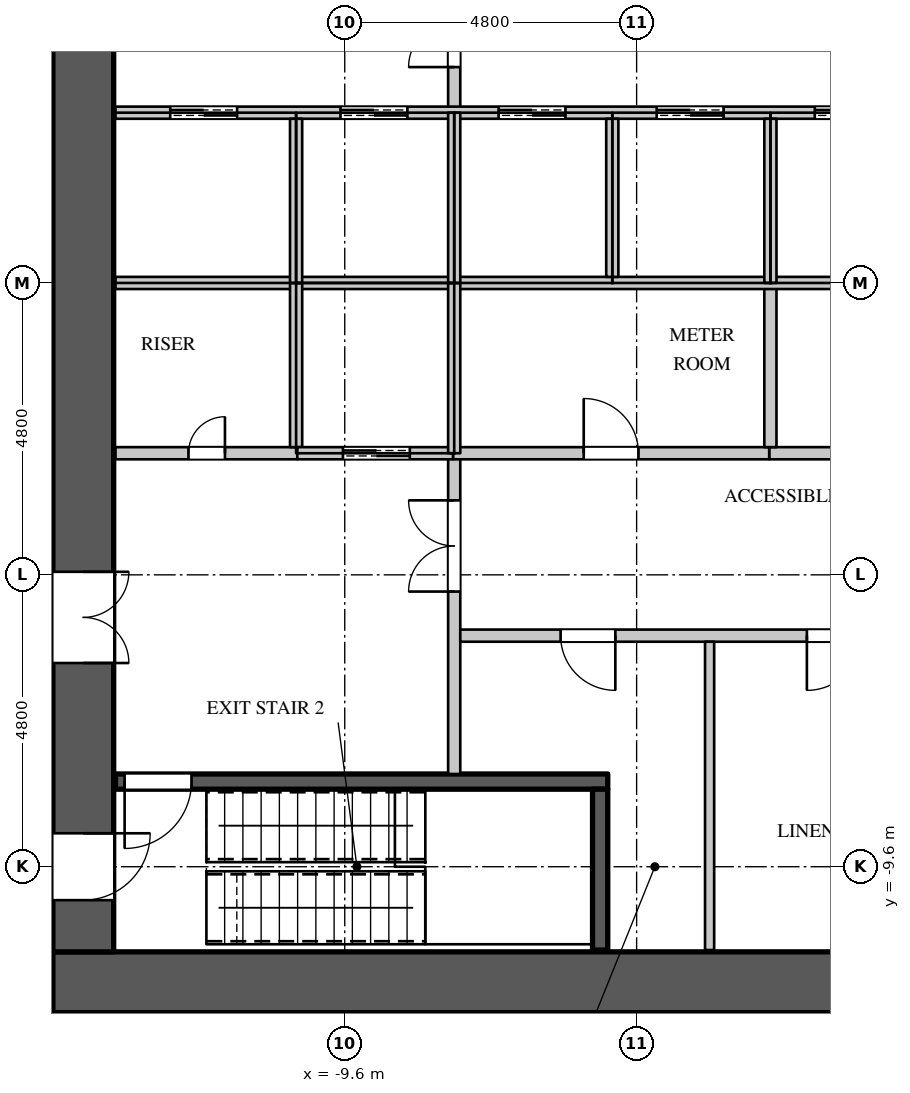
"""IFC4 building model, lengths in metres.
Left out: names, types, materials, properties, quantities, classifications, styles, units other than length and angle.
Written with IfcOpenShell. Run it as: python <this file> out.ifc"""

import sys

from ifc_helpers import new_model, si_unit, direction, frame, frame_2d, origin, place, context, subcontext, project, spatial, rectangle, extrude, element, fill, save


model = new_model("IFC4")
c1 = context("Model", 3, precision=1e-05, world=origin(), true_north=direction((0.0, 1.0)))
c2 = subcontext(c1, "Body", "Model", "MODEL_VIEW")
j1 = project(units=[si_unit("LENGTHUNIT", "METRE"), si_unit("PLANEANGLEUNIT", "RADIAN")], contexts=[c1])
p1 = place(None, origin())
s1 = spatial("IfcSite", under=j1, at=p1, CompositionType="ELEMENT")
p2 = place(p1, origin())
s2 = spatial("IfcBuilding", under=s1, at=p2, CompositionType="ELEMENT")
p3 = place(p2, frame((0.0, 0.0, 92.7)))
s3 = spatial("IfcBuildingStorey", under=s2, at=p3, CompositionType="ELEMENT", Elevation=92.7)
p4 = place(p3, frame((-14.4, -11.5, 0.0), z_axis=(0.0, 0.0, 1.0), x_axis=(1.0, 0.0, 0.0)))
e1 = element("IfcWall", 1, at=p4, inside=s3, PredefinedType="SHEAR", context=c2, shape_type="SweptSolid", body=[
    extrude(rectangle(XDim=28.8, YDim=1.0, at=frame_2d((14.4, 0.0))), origin(), (0.0, 0.0, 1.0), 4.2),
])
p5 = place(p3, frame((-13.9, -11.0, 0.0), z_axis=(0.0, 0.0, 1.0), x_axis=(0.0, 1.0, 0.0)))
e2 = element("IfcWall", 2, at=p5, inside=s3, PredefinedType="SHEAR", context=c2, shape_type="SweptSolid", body=[
    extrude(rectangle(XDim=22.0, YDim=1.0, at=frame_2d((11.0, 0.0))), origin(), (0.0, 0.0, 1.0), 4.2),
])
p6 = place(p5, frame((20.05, 0.0, 0.0)))
e3 = element("IfcOpeningElement", 3, at=p6, cuts=e2, PredefinedType="OPENING", context=c2, shape_type="SweptSolid", body=[
    extrude(rectangle(XDim=1.1, YDim=2.2, at=frame_2d((0.55, 1.1))), frame((0.0, 0.51, 0.0), z_axis=(0.0, -1.0, 0.0), x_axis=(1.0, 0.0, 0.0)), (0.0, 0.0, 1.0), 1.02),
])
p7 = place(p5, frame((0.85, 0.0, 0.0)))
e4 = element("IfcOpeningElement", 4, at=p7, cuts=e2, PredefinedType="OPENING", context=c2, shape_type="SweptSolid", body=[
    extrude(rectangle(XDim=1.1, YDim=2.2, at=frame_2d((0.55, 1.1))), frame((0.0, 0.51, 0.0), z_axis=(0.0, -1.0, 0.0), x_axis=(1.0, 0.0, 0.0)), (0.0, 0.0, 1.0), 1.02),
])
p8 = place(p5, frame((15.75, 0.0, 0.0)))
e5 = element("IfcOpeningElement", 5, at=p8, cuts=e2, PredefinedType="OPENING", context=c2, shape_type="SweptSolid", body=[
    extrude(rectangle(XDim=1.5, YDim=2.4, at=frame_2d((0.75, 1.2))), frame((0.0, 0.51, 0.0), z_axis=(0.0, -1.0, 0.0), x_axis=(1.0, 0.0, 0.0)), (0.0, 0.0, 1.0), 1.02),
])
p9 = place(p5, frame((4.75, 0.0, 0.0)))
e6 = element("IfcOpeningElement", 6, at=p9, cuts=e2, PredefinedType="OPENING", context=c2, shape_type="SweptSolid", body=[
    extrude(rectangle(XDim=1.5, YDim=2.4, at=frame_2d((0.75, 1.2))), frame((0.0, 0.51, 0.0), z_axis=(0.0, -1.0, 0.0), x_axis=(1.0, 0.0, 0.0)), (0.0, 0.0, 1.0), 1.02),
])
p10 = place(p3, frame((-7.8, -8.075, 0.0), z_axis=(0.0, 0.0, 1.0), x_axis=(0.0, 1.0, 0.0)))
e7 = element("IfcWall", 7, at=p10, inside=s3, PredefinedType="PARTITIONING", context=c2, shape_type="SweptSolid", body=[
    extrude(rectangle(XDim=5.275, YDim=0.2, at=frame_2d((2.637, 0.0))), origin(), (0.0, 0.0, 1.0), 3.798),
])
p11 = place(p10, frame((3.0, 0.0, 0.0)))
e8 = element("IfcOpeningElement", 8, at=p11, cuts=e7, PredefinedType="OPENING", context=c2, shape_type="SweptSolid", body=[
    extrude(rectangle(XDim=1.5, YDim=2.4, at=frame_2d((0.75, 1.2))), frame((0.0, 0.11, 0.0), z_axis=(0.0, -1.0, 0.0), x_axis=(1.0, 0.0, 0.0)), (0.0, 0.0, 1.0), 0.22),
])
p12 = place(p3, frame((-7.7, -5.8, 0.0), z_axis=(0.0, 0.0, 1.0), x_axis=(1.0, 0.0, 0.0)))
e9 = element("IfcWall", 9, at=p12, inside=s3, PredefinedType="PARTITIONING", context=c2, shape_type="SweptSolid", body=[
    extrude(rectangle(XDim=21.07, YDim=0.2, at=frame_2d((10.535, 0.0))), origin(), (0.0, 0.0, 1.0), 3.798),
])
p13 = place(p12, frame((1.65, 0.0, 0.0)))
e10 = element("IfcOpeningElement", 10, at=p13, cuts=e9, PredefinedType="OPENING", context=c2, shape_type="SweptSolid", body=[
    extrude(rectangle(XDim=0.9, YDim=2.2, at=frame_2d((0.45, 1.1))), frame((0.0, 0.11, 0.0), z_axis=(0.0, -1.0, 0.0), x_axis=(1.0, 0.0, 0.0)), (0.0, 0.0, 1.0), 0.22),
])
p14 = place(p12, frame((5.7, 0.0, 0.0)))
e11 = element("IfcOpeningElement", 11, at=p14, cuts=e9, PredefinedType="OPENING", context=c2, shape_type="SweptSolid", body=[
    extrude(rectangle(XDim=0.9, YDim=2.2, at=frame_2d((0.45, 1.1))), frame((0.0, 0.11, 0.0), z_axis=(0.0, -1.0, 0.0), x_axis=(1.0, 0.0, 0.0)), (0.0, 0.0, 1.0), 0.22),
])
p15 = place(p12, frame((10.2, 0.0, 0.0)))
e12 = element("IfcOpeningElement", 12, at=p15, cuts=e9, PredefinedType="OPENING", context=c2, shape_type="SweptSolid", body=[
    extrude(rectangle(XDim=0.9, YDim=2.2, at=frame_2d((0.45, 1.1))), frame((0.0, 0.11, 0.0), z_axis=(0.0, -1.0, 0.0), x_axis=(1.0, 0.0, 0.0)), (0.0, 0.0, 1.0), 0.22),
])
p16 = place(p12, frame((14.55, 0.0, 0.0)))
e13 = element("IfcOpeningElement", 13, at=p16, cuts=e9, PredefinedType="OPENING", context=c2, shape_type="SweptSolid", body=[
    extrude(rectangle(XDim=0.9, YDim=2.2, at=frame_2d((0.45, 1.1))), frame((0.0, 0.11, 0.0), z_axis=(0.0, -1.0, 0.0), x_axis=(1.0, 0.0, 0.0)), (0.0, 0.0, 1.0), 0.22),
])
p17 = place(p12, frame((18.5, 0.0, 0.0)))
e14 = element("IfcOpeningElement", 14, at=p17, cuts=e9, PredefinedType="OPENING", context=c2, shape_type="SweptSolid", body=[
    extrude(rectangle(XDim=0.9, YDim=2.2, at=frame_2d((0.45, 1.1))), frame((0.0, 0.11, 0.0), z_axis=(0.0, -1.0, 0.0), x_axis=(1.0, 0.0, 0.0)), (0.0, 0.0, 1.0), 0.22),
])
p18 = place(p3, frame((-7.8, 2.8, 0.0), z_axis=(0.0, 0.0, 1.0), x_axis=(0.0, 1.0, 0.0)))
e15 = element("IfcWall", 15, at=p18, inside=s3, PredefinedType="PARTITIONING", context=c2, shape_type="SweptSolid", body=[
    extrude(rectangle(XDim=5.275, YDim=0.2, at=frame_2d((2.637, 0.0))), origin(), (0.0, 0.0, 1.0), 3.798),
])
p19 = place(p18, frame((0.75, 0.0, 0.0)))
e16 = element("IfcOpeningElement", 16, at=p19, cuts=e15, PredefinedType="OPENING", context=c2, shape_type="SweptSolid", body=[
    extrude(rectangle(XDim=1.5, YDim=2.4, at=frame_2d((0.75, 1.2))), frame((0.0, 0.11, 0.0), z_axis=(0.0, -1.0, 0.0), x_axis=(1.0, 0.0, 0.0)), (0.0, 0.0, 1.0), 0.22),
])
p20 = place(p3, frame((-2.62, -2.8, 0.0), z_axis=(0.0, 0.0, 1.0), x_axis=(1.0, 0.0, 0.0)))
e17 = element("IfcWall", 17, at=p20, inside=s3, PredefinedType="PARTITIONING", context=c2, shape_type="SweptSolid", body=[
    extrude(rectangle(XDim=10.44, YDim=0.2, at=frame_2d((5.22, 0.0))), origin(), (0.0, 0.0, 1.0), 3.798),
])
p21 = place(p20, frame((2.25, 0.0, 0.0)))
e18 = element("IfcOpeningElement", 18, at=p21, cuts=e17, PredefinedType="OPENING", context=c2, shape_type="SweptSolid", body=[
    extrude(rectangle(XDim=0.9, YDim=2.2, at=frame_2d((0.45, 1.1))), frame((0.0, 0.11, 0.0), z_axis=(0.0, -1.0, 0.0), x_axis=(1.0, 0.0, 0.0)), (0.0, 0.0, 1.0), 0.22),
])
p22 = place(p20, frame((7.3, 0.0, 0.0)))
e19 = element("IfcOpeningElement", 19, at=p22, cuts=e17, PredefinedType="OPENING", context=c2, shape_type="SweptSolid", body=[
    extrude(rectangle(XDim=0.9, YDim=2.2, at=frame_2d((0.45, 1.1))), frame((0.0, 0.11, 0.0), z_axis=(0.0, -1.0, 0.0), x_axis=(1.0, 0.0, 0.0)), (0.0, 0.0, 1.0), 0.22),
])
p23 = place(p3, frame((-3.6, -10.97, 0.0), z_axis=(0.0, 0.0, 1.0), x_axis=(0.0, 1.0, 0.0)))
e20 = element("IfcWall", 20, at=p23, inside=s3, PredefinedType="PARTITIONING", context=c2, shape_type="SweptSolid", body=[
    extrude(rectangle(XDim=5.07, YDim=0.15, at=frame_2d((2.535, 0.0))), origin(), (0.0, 0.0, 1.0), 3.798),
])
p24 = place(p3, frame((-13.37, -2.8, 0.0), z_axis=(0.0, 0.0, 1.0), x_axis=(1.0, 0.0, 0.0)))
e21 = element("IfcWall", 21, at=p24, inside=s3, PredefinedType="PARTITIONING", context=c2, shape_type="SweptSolid", body=[
    extrude(rectangle(XDim=2.99, YDim=0.2, at=frame_2d((1.495, 0.0))), origin(), (0.0, 0.0, 1.0), 3.798),
])
p25 = place(p24, frame((1.2, 0.0, 0.0)))
e22 = element("IfcOpeningElement", 22, at=p25, cuts=e21, PredefinedType="OPENING", context=c2, shape_type="SweptSolid", body=[
    extrude(rectangle(XDim=0.6, YDim=2.0, at=frame_2d((0.3, 1.0))), frame((0.0, 0.11, 0.0), z_axis=(0.0, -1.0, 0.0), x_axis=(1.0, 0.0, 0.0)), (0.0, 0.0, 1.0), 0.22),
])
p26 = place(p3, frame((-7.82, -2.8, 0.0), z_axis=(0.0, 0.0, 1.0), x_axis=(1.0, 0.0, 0.0)))
e23 = element("IfcWall", 23, at=p26, inside=s3, PredefinedType="PARTITIONING", context=c2, shape_type="SweptSolid", body=[
    extrude(rectangle(XDim=5.2, YDim=0.2, at=frame_2d((2.6, 0.0))), origin(), (0.0, 0.0, 1.0), 3.798),
])
p27 = place(p26, frame((2.15, 0.0, 0.0)))
e24 = element("IfcOpeningElement", 24, at=p27, cuts=e23, PredefinedType="OPENING", context=c2, shape_type="SweptSolid", body=[
    extrude(rectangle(XDim=0.9, YDim=2.2, at=frame_2d((0.45, 1.1))), frame((0.0, 0.11, 0.0), z_axis=(0.0, -1.0, 0.0), x_axis=(1.0, 0.0, 0.0)), (0.0, 0.0, 1.0), 0.22),
])
p28 = place(p3, frame((-2.6, -2.7, 0.0), z_axis=(0.0, 0.0, 1.0), x_axis=(0.0, 1.0, 0.0)))
e25 = element("IfcWall", 25, at=p28, inside=s3, PredefinedType="PARTITIONING", context=c2, shape_type="SweptSolid", body=[
    extrude(rectangle(XDim=2.7, YDim=0.2, at=frame_2d((1.35, 0.0))), origin(), (0.0, 0.0, 1.0), 3.798),
])
p29 = place(p3, frame((-13.37, 0.0, 0.0), z_axis=(0.0, 0.0, 1.0), x_axis=(1.0, 0.0, 0.0)))
e26 = element("IfcWall", 26, at=p29, inside=s3, PredefinedType="PARTITIONING", context=c2, shape_type="SweptSolid", body=[
    extrude(rectangle(XDim=23.77, YDim=0.2, at=frame_2d((11.885, 0.0))), origin(), (0.0, 0.0, 1.0), 3.798),
])
p30 = place(p3, frame((-13.37, 2.8, 0.0), z_axis=(0.0, 0.0, 1.0), x_axis=(1.0, 0.0, 0.0)))
e27 = element("IfcWall", 27, at=p30, inside=s3, PredefinedType="PARTITIONING", context=c2, shape_type="SweptSolid", body=[
    extrude(rectangle(XDim=23.77, YDim=0.2, at=frame_2d((11.885, 0.0))), origin(), (0.0, 0.0, 1.0), 3.798),
])
p31 = place(p30, frame((0.9, 0.0, 0.0)))
e28 = element("IfcOpeningElement", 28, at=p31, cuts=e27, PredefinedType="OPENING", context=c2, shape_type="SweptSolid", body=[
    extrude(rectangle(XDim=1.1, YDim=2.2, at=frame_2d((0.55, 1.1))), frame((0.0, 0.11, 0.0), z_axis=(0.0, -1.0, 0.0), x_axis=(1.0, 0.0, 0.0)), (0.0, 0.0, 1.0), 0.22),
])
p32 = place(p30, frame((3.7, 0.0, 0.0)))
e29 = element("IfcOpeningElement", 29, at=p32, cuts=e27, PredefinedType="OPENING", context=c2, shape_type="SweptSolid", body=[
    extrude(rectangle(XDim=1.1, YDim=2.2, at=frame_2d((0.55, 1.1))), frame((0.0, 0.11, 0.0), z_axis=(0.0, -1.0, 0.0), x_axis=(1.0, 0.0, 0.0)), (0.0, 0.0, 1.0), 0.22),
])
p33 = place(p30, frame((6.3, 0.0, 0.0)))
e30 = element("IfcOpeningElement", 30, at=p33, cuts=e27, PredefinedType="OPENING", context=c2, shape_type="SweptSolid", body=[
    extrude(rectangle(XDim=1.1, YDim=2.2, at=frame_2d((0.55, 1.1))), frame((0.0, 0.11, 0.0), z_axis=(0.0, -1.0, 0.0), x_axis=(1.0, 0.0, 0.0)), (0.0, 0.0, 1.0), 0.22),
])
p34 = place(p30, frame((8.9, 0.0, 0.0)))
e31 = element("IfcOpeningElement", 31, at=p34, cuts=e27, PredefinedType="OPENING", context=c2, shape_type="SweptSolid", body=[
    extrude(rectangle(XDim=1.1, YDim=2.2, at=frame_2d((0.55, 1.1))), frame((0.0, 0.11, 0.0), z_axis=(0.0, -1.0, 0.0), x_axis=(1.0, 0.0, 0.0)), (0.0, 0.0, 1.0), 0.22),
])
p35 = place(p30, frame((11.5, 0.0, 0.0)))
e32 = element("IfcOpeningElement", 32, at=p35, cuts=e27, PredefinedType="OPENING", context=c2, shape_type="SweptSolid", body=[
    extrude(rectangle(XDim=1.1, YDim=2.2, at=frame_2d((0.55, 1.1))), frame((0.0, 0.11, 0.0), z_axis=(0.0, -1.0, 0.0), x_axis=(1.0, 0.0, 0.0)), (0.0, 0.0, 1.0), 0.22),
])
p36 = place(p30, frame((14.1, 0.0, 0.0)))
e33 = element("IfcOpeningElement", 33, at=p36, cuts=e27, PredefinedType="OPENING", context=c2, shape_type="SweptSolid", body=[
    extrude(rectangle(XDim=1.1, YDim=2.2, at=frame_2d((0.55, 1.1))), frame((0.0, 0.11, 0.0), z_axis=(0.0, -1.0, 0.0), x_axis=(1.0, 0.0, 0.0)), (0.0, 0.0, 1.0), 0.22),
])
p37 = place(p30, frame((16.7, 0.0, 0.0)))
e34 = element("IfcOpeningElement", 34, at=p37, cuts=e27, PredefinedType="OPENING", context=c2, shape_type="SweptSolid", body=[
    extrude(rectangle(XDim=1.1, YDim=2.2, at=frame_2d((0.55, 1.1))), frame((0.0, 0.11, 0.0), z_axis=(0.0, -1.0, 0.0), x_axis=(1.0, 0.0, 0.0)), (0.0, 0.0, 1.0), 0.22),
])
p38 = place(p30, frame((19.3, 0.0, 0.0)))
e35 = element("IfcOpeningElement", 35, at=p38, cuts=e27, PredefinedType="OPENING", context=c2, shape_type="SweptSolid", body=[
    extrude(rectangle(XDim=1.1, YDim=2.2, at=frame_2d((0.55, 1.1))), frame((0.0, 0.11, 0.0), z_axis=(0.0, -1.0, 0.0), x_axis=(1.0, 0.0, 0.0)), (0.0, 0.0, 1.0), 0.22),
])
p39 = place(p3, frame((-10.4, -2.7, 0.0), z_axis=(0.0, 0.0, 1.0), x_axis=(0.0, 1.0, 0.0)))
e36 = element("IfcWall", 36, at=p39, inside=s3, PredefinedType="PARTITIONING", context=c2, shape_type="SweptSolid", body=[
    extrude(rectangle(XDim=2.7, YDim=0.2, at=frame_2d((1.35, 0.0))), origin(), (0.0, 0.0, 1.0), 3.798),
])
p40 = place(p3, frame((-10.38, -2.8, 0.0), z_axis=(0.0, 0.0, 1.0), x_axis=(1.0, 0.0, 0.0)))
e37 = element("IfcWall", 37, at=p40, inside=s3, PredefinedType="PARTITIONING", context=c2, shape_type="SweptSolid", body=[
    extrude(rectangle(XDim=2.56, YDim=0.2, at=frame_2d((1.28, 0.0))), origin(), (0.0, 0.0, 1.0), 3.798),
])
p41 = place(p40, frame((0.75, 0.0, 0.0)))
e38 = element("IfcOpeningElement", 38, at=p41, cuts=e37, PredefinedType="OPENING", context=c2, shape_type="SweptSolid", body=[
    extrude(rectangle(XDim=1.1, YDim=2.2, at=frame_2d((0.55, 1.1))), frame((0.0, 0.11, 0.0), z_axis=(0.0, -1.0, 0.0), x_axis=(1.0, 0.0, 0.0)), (0.0, 0.0, 1.0), 0.22),
])
p42 = place(p3, frame((-10.4, 0.0, 0.0), z_axis=(0.0, 0.0, 1.0), x_axis=(0.0, 1.0, 0.0)))
e39 = element("IfcWall", 39, at=p42, inside=s3, PredefinedType="PARTITIONING", context=c2, shape_type="SweptSolid", body=[
    extrude(rectangle(XDim=2.7, YDim=0.2, at=frame_2d((1.35, 0.0))), origin(), (0.0, 0.0, 1.0), 3.798),
])
for number, where, z_axis, x_axis in (
    (40, (-7.8, -2.8, 0.0), (0.0, 0.0, 1.0), (0.0, 1.0, 0.0)),
    (41, (-7.8, 0.0, 0.0), (0.0, 0.0, 1.0), (0.0, 1.0, 0.0)),
):
    element("IfcWall", number, at=place(p3, frame(where, z_axis=z_axis, x_axis=x_axis)), inside=s3, PredefinedType="PARTITIONING", context=c2, shape_type="SweptSolid", body=[
        extrude(rectangle(XDim=2.8, YDim=0.2, at=frame_2d((1.4, 0.0))), origin(), (0.0, 0.0, 1.0), 3.798),
    ])
p43 = place(p3, frame((-5.2, 0.1, 0.0), z_axis=(0.0, 0.0, 1.0), x_axis=(0.0, 1.0, 0.0)))
e42 = element("IfcWall", 42, at=p43, inside=s3, PredefinedType="PARTITIONING", context=c2, shape_type="SweptSolid", body=[
    extrude(rectangle(XDim=2.6, YDim=0.2, at=frame_2d((1.3, 0.0))), origin(), (0.0, 0.0, 1.0), 3.798),
])
p44 = place(p3, frame((-2.6, 0.0, 0.0), z_axis=(0.0, 0.0, 1.0), x_axis=(0.0, 1.0, 0.0)))
e43 = element("IfcWall", 43, at=p44, inside=s3, PredefinedType="PARTITIONING", context=c2, shape_type="SweptSolid", body=[
    extrude(rectangle(XDim=2.7, YDim=0.2, at=frame_2d((1.35, 0.0))), origin(), (0.0, 0.0, 1.0), 3.798),
])
p45 = place(p3, frame((-13.37, -8.2, 0.0), z_axis=(0.0, 0.0, 1.0), x_axis=(1.0, 0.0, 0.0)))
e44 = element("IfcWall", 44, at=p45, inside=s3, PredefinedType="SHEAR", context=c2, shape_type="SweptSolid", body=[
    extrude(rectangle(XDim=8.095, YDim=0.25, at=frame_2d((4.048, 0.0))), origin(), (0.0, 0.0, 1.0), 3.798),
])
p46 = place(p45, frame((0.15, 0.0, 0.0)))
e45 = element("IfcOpeningElement", 45, at=p46, cuts=e44, PredefinedType="OPENING", context=c2, shape_type="SweptSolid", body=[
    extrude(rectangle(XDim=1.1, YDim=2.2, at=frame_2d((0.55, 1.1))), frame((0.0, 0.135, 0.0), z_axis=(0.0, -1.0, 0.0), x_axis=(1.0, 0.0, 0.0)), (0.0, 0.0, 1.0), 0.27),
])
p47 = place(p3, frame((-5.4, -10.97, 0.0), z_axis=(0.0, 0.0, 1.0), x_axis=(0.0, 1.0, 0.0)))
e46 = element("IfcWall", 46, at=p47, inside=s3, PredefinedType="SHEAR", context=c2, shape_type="SweptSolid", body=[
    extrude(rectangle(XDim=2.645, YDim=0.25, at=frame_2d((1.323, 0.0))), origin(), (0.0, 0.0, 1.0), 3.798),
])
p48 = place(p25, origin())
e47 = element("IfcDoor", 47, at=p48, inside=s3, OperationType="SINGLE_SWING_RIGHT", PredefinedType="DOOR", context=c2, shape_type="SweptSolid", body=[
    extrude(rectangle(XDim=0.6, YDim=2.0, at=frame_2d((0.3, 1.0))), frame((0.0, 0.025, 0.0), z_axis=(0.0, -1.0, 0.0), x_axis=(1.0, 0.0, 0.0)), (0.0, 0.0, 1.0), 0.05),
])
fill(e22, e47)
p49 = place(p13, origin())
e48 = element("IfcDoor", 48, at=p49, inside=s3, OperationType="SINGLE_SWING_LEFT", PredefinedType="DOOR", context=c2, shape_type="SweptSolid", body=[
    extrude(rectangle(XDim=0.9, YDim=2.2, at=frame_2d((0.45, 1.1))), frame((0.0, 0.025, 0.0), z_axis=(0.0, -1.0, 0.0), x_axis=(1.0, 0.0, 0.0)), (0.0, 0.0, 1.0), 0.05),
])
fill(e10, e48)
p50 = place(p14, origin())
e49 = element("IfcDoor", 49, at=p50, inside=s3, OperationType="SINGLE_SWING_RIGHT", PredefinedType="DOOR", context=c2, shape_type="SweptSolid", body=[
    extrude(rectangle(XDim=0.9, YDim=2.2, at=frame_2d((0.45, 1.1))), frame((0.0, 0.025, 0.0), z_axis=(0.0, -1.0, 0.0), x_axis=(1.0, 0.0, 0.0)), (0.0, 0.0, 1.0), 0.05),
])
fill(e11, e49)
p51 = place(p27, origin())
e50 = element("IfcDoor", 50, at=p51, inside=s3, OperationType="SINGLE_SWING_LEFT", PredefinedType="DOOR", context=c2, shape_type="SweptSolid", body=[
    extrude(rectangle(XDim=0.9, YDim=2.2, at=frame_2d((0.45, 1.1))), frame((0.0, 0.025, 0.0), z_axis=(0.0, -1.0, 0.0), x_axis=(1.0, 0.0, 0.0)), (0.0, 0.0, 1.0), 0.05),
])
fill(e24, e50)
p52 = place(p31, origin())
e51 = element("IfcDoor", 51, at=p52, inside=s3, OperationType="DOUBLE_DOOR_SLIDING", PredefinedType="DOOR", context=c2, shape_type="SweptSolid", body=[
    extrude(rectangle(XDim=1.1, YDim=2.2, at=frame_2d((0.55, 1.1))), frame((0.0, 0.025, 0.0), z_axis=(0.0, -1.0, 0.0), x_axis=(1.0, 0.0, 0.0)), (0.0, 0.0, 1.0), 0.05),
])
fill(e28, e51)
p53 = place(p32, origin())
e52 = element("IfcDoor", 52, at=p53, inside=s3, OperationType="DOUBLE_DOOR_SLIDING", PredefinedType="DOOR", context=c2, shape_type="SweptSolid", body=[
    extrude(rectangle(XDim=1.1, YDim=2.2, at=frame_2d((0.55, 1.1))), frame((0.0, 0.025, 0.0), z_axis=(0.0, -1.0, 0.0), x_axis=(1.0, 0.0, 0.0)), (0.0, 0.0, 1.0), 0.05),
])
fill(e29, e52)
p54 = place(p41, origin())
e53 = element("IfcDoor", 53, at=p54, inside=s3, OperationType="DOUBLE_DOOR_SLIDING", PredefinedType="DOOR", context=c2, shape_type="SweptSolid", body=[
    extrude(rectangle(XDim=1.1, YDim=2.2, at=frame_2d((0.55, 1.1))), frame((0.0, 0.025, 0.0), z_axis=(0.0, -1.0, 0.0), x_axis=(1.0, 0.0, 0.0)), (0.0, 0.0, 1.0), 0.05),
])
fill(e38, e53)
p55 = place(p33, origin())
e54 = element("IfcDoor", 54, at=p55, inside=s3, OperationType="DOUBLE_DOOR_SLIDING", PredefinedType="DOOR", context=c2, shape_type="SweptSolid", body=[
    extrude(rectangle(XDim=1.1, YDim=2.2, at=frame_2d((0.55, 1.1))), frame((0.0, 0.025, 0.0), z_axis=(0.0, -1.0, 0.0), x_axis=(1.0, 0.0, 0.0)), (0.0, 0.0, 1.0), 0.05),
])
fill(e30, e54)
p56 = place(p34, origin())
e55 = element("IfcDoor", 55, at=p56, inside=s3, OperationType="DOUBLE_DOOR_SLIDING", PredefinedType="DOOR", context=c2, shape_type="SweptSolid", body=[
    extrude(rectangle(XDim=1.1, YDim=2.2, at=frame_2d((0.55, 1.1))), frame((0.0, 0.025, 0.0), z_axis=(0.0, -1.0, 0.0), x_axis=(1.0, 0.0, 0.0)), (0.0, 0.0, 1.0), 0.05),
])
fill(e31, e55)
p57 = place(p35, origin())
e56 = element("IfcDoor", 56, at=p57, inside=s3, OperationType="DOUBLE_DOOR_SLIDING", PredefinedType="DOOR", context=c2, shape_type="SweptSolid", body=[
    extrude(rectangle(XDim=1.1, YDim=2.2, at=frame_2d((0.55, 1.1))), frame((0.0, 0.025, 0.0), z_axis=(0.0, -1.0, 0.0), x_axis=(1.0, 0.0, 0.0)), (0.0, 0.0, 1.0), 0.05),
])
fill(e32, e56)
p58 = place(p46, origin())
e57 = element("IfcDoor", 57, at=p58, inside=s3, OperationType="SINGLE_SWING_RIGHT", PredefinedType="DOOR", context=c2, shape_type="SweptSolid", body=[
    extrude(rectangle(XDim=1.1, YDim=2.2, at=frame_2d((0.55, 1.1))), frame((0.0, 0.025, 0.0), z_axis=(0.0, -1.0, 0.0), x_axis=(1.0, 0.0, 0.0)), (0.0, 0.0, 1.0), 0.05),
])
fill(e45, e57)
p59 = place(p19, origin())
e58 = element("IfcDoor", 58, at=p59, inside=s3, OperationType="DOUBLE_DOOR_SINGLE_SWING", PredefinedType="DOOR", context=c2, shape_type="SweptSolid", body=[
    extrude(rectangle(XDim=1.5, YDim=2.4, at=frame_2d((0.75, 1.2))), frame((0.0, 0.025, 0.0), z_axis=(0.0, -1.0, 0.0), x_axis=(1.0, 0.0, 0.0)), (0.0, 0.0, 1.0), 0.05),
])
fill(e16, e58)
p60 = place(p11, origin())
e59 = element("IfcDoor", 59, at=p60, inside=s3, OperationType="DOUBLE_DOOR_SINGLE_SWING", PredefinedType="DOOR", context=c2, shape_type="SweptSolid", body=[
    extrude(rectangle(XDim=1.5, YDim=2.4, at=frame_2d((0.75, 1.2))), frame((0.0, 0.025, 0.0), z_axis=(0.0, -1.0, 0.0), x_axis=(1.0, 0.0, 0.0)), (0.0, 0.0, 1.0), 0.05),
])
fill(e8, e59)
p61 = place(p7, origin())
e60 = element("IfcDoor", 60, at=p61, inside=s3, OperationType="SINGLE_SWING_LEFT", PredefinedType="DOOR", context=c2, shape_type="SweptSolid", body=[
    extrude(rectangle(XDim=1.1, YDim=2.2, at=frame_2d((0.55, 1.1))), frame((0.0, -0.445, 0.0), z_axis=(0.0, -1.0, 0.0), x_axis=(1.0, 0.0, 0.0)), (0.0, 0.0, 1.0), 0.05),
])
fill(e4, e60)
p62 = place(p9, origin())
e61 = element("IfcDoor", 61, at=p62, inside=s3, OperationType="DOUBLE_DOOR_SINGLE_SWING", PredefinedType="DOOR", context=c2, shape_type="SweptSolid", body=[
    extrude(rectangle(XDim=1.5, YDim=2.4, at=frame_2d((0.75, 1.2))), frame((0.0, -0.445, 0.0), z_axis=(0.0, -1.0, 0.0), x_axis=(1.0, 0.0, 0.0)), (0.0, 0.0, 1.0), 0.05),
])
fill(e6, e61)
save(model, sys.argv[1])
